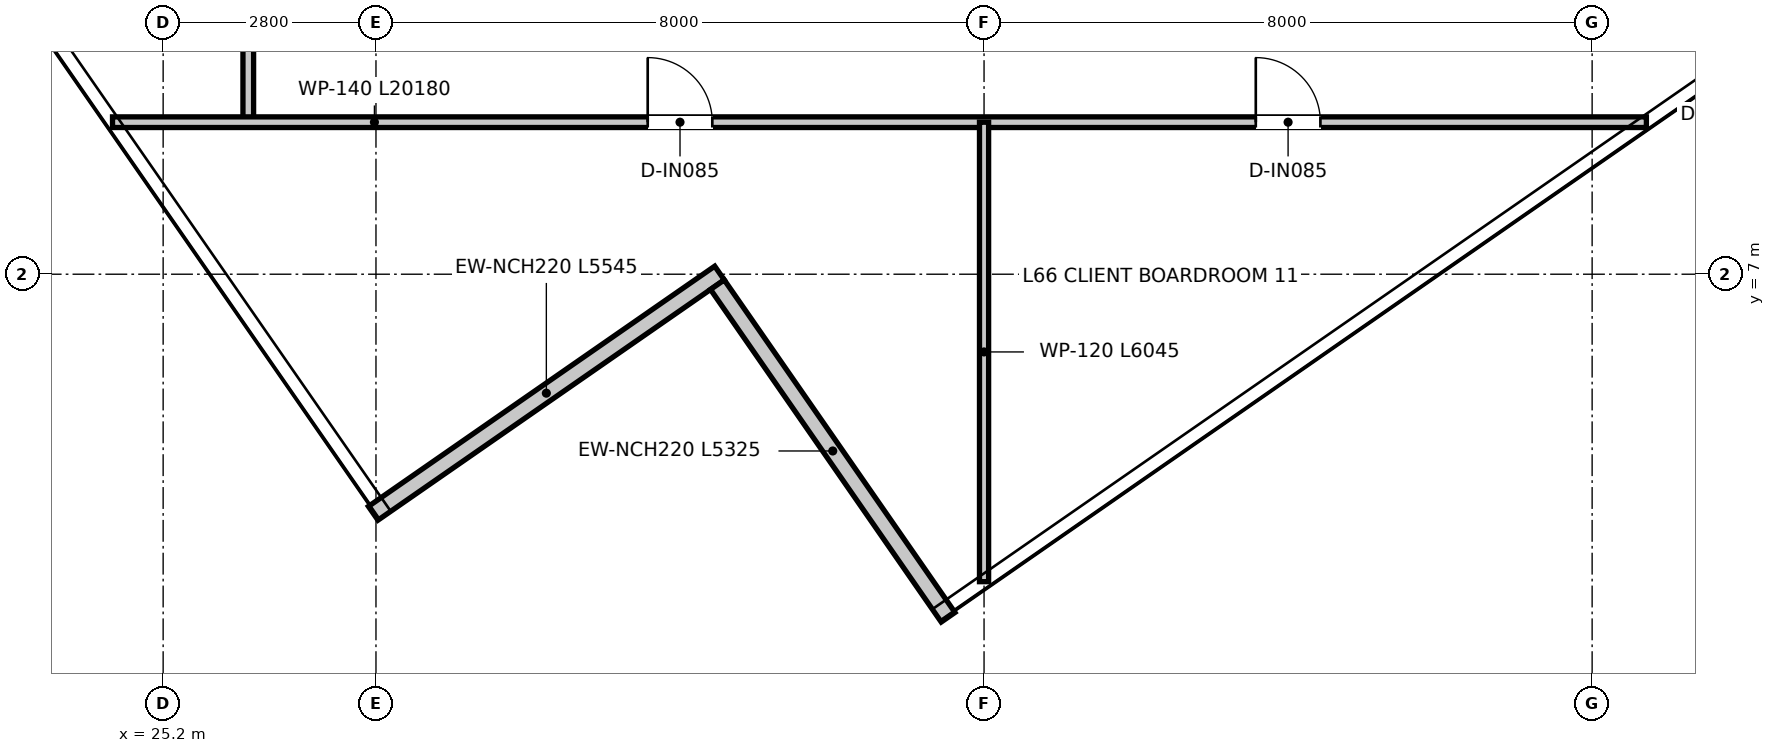
"""IFC4 building model, lengths in metres.
Left out: names, types, materials, properties, quantities, classifications, styles, units other than length and angle.
Written with IfcOpenShell. Run it as: python <this file> out.ifc"""

import sys

from ifc_helpers import new_model, si_unit, direction, frame, frame_2d, origin, place, context, subcontext, project, spatial, rectangle, extrude, element, fill, save


model = new_model("IFC4")
c1 = context("Model", 3, precision=1e-05, world=origin(), true_north=direction((0.0, 1.0)))
c2 = subcontext(c1, "Body", "Model", "MODEL_VIEW")
j1 = project(units=[si_unit("LENGTHUNIT", "METRE"), si_unit("PLANEANGLEUNIT", "RADIAN")], contexts=[c1])
p1 = place(None, origin())
s1 = spatial("IfcSite", under=j1, at=p1, CompositionType="ELEMENT")
p2 = place(p1, origin())
s2 = spatial("IfcBuilding", under=s1, at=p2, CompositionType="ELEMENT")
p3 = place(p2, frame((0.0, 0.0, 271.35)))
s3 = spatial("IfcBuildingStorey", under=s2, at=p3, CompositionType="ELEMENT", Elevation=271.35)
p4 = place(p3, frame((27.963, 3.855, 0.0), z_axis=(0.0, 0.0, 1.0), x_axis=(0.821652918874, 0.569988141022, 0.0)))
e1 = element("IfcWall", 1, at=p4, inside=s3, PredefinedType="ELEMENTEDWALL", context=c2, shape_type="SweptSolid", body=[
    extrude(rectangle(XDim=5.545, YDim=0.22, at=frame_2d((2.772, 0.0))), origin(), (0.0, 0.0, 1.0), 3.67),
])
p5 = place(p3, frame((32.492, 6.862, 0.0), z_axis=(0.0, 0.0, 1.0), x_axis=(0.569998811791, -0.821645516361, 0.0)))
e2 = element("IfcWall", 2, at=p5, inside=s3, PredefinedType="ELEMENTEDWALL", context=c2, shape_type="SweptSolid", body=[
    extrude(rectangle(XDim=5.325, YDim=0.22, at=frame_2d((2.663, 0.0))), origin(), (0.0, 0.0, 1.0), 3.67),
])
p6 = place(p3, frame((26.32, 9.0, 0.0), z_axis=(0.0, 0.0, 1.0), x_axis=(0.0, 1.0, 0.0)))
e3 = element("IfcWall", 3, at=p6, inside=s3, PredefinedType="PARTITIONING", context=c2, shape_type="SweptSolid", body=[
    extrude(rectangle(XDim=19.66, YDim=0.14, at=frame_2d((9.83, 0.0))), origin(), (0.0, 0.0, 1.0), 3.13),
])
p7 = place(p6, frame((18.3, 0.0, 0.0)))
e4 = element("IfcOpeningElement", 4, at=p7, cuts=e3, PredefinedType="OPENING", context=c2, shape_type="SweptSolid", body=[
    extrude(rectangle(XDim=0.9, YDim=2.1, at=frame_2d((0.45, 1.05))), frame((0.0, 0.08, 0.0), z_axis=(0.0, -1.0, 0.0), x_axis=(1.0, 0.0, 0.0)), (0.0, 0.0, 1.0), 0.16),
])
p8 = place(p6, frame((9.8, 0.0, 0.0)))
e5 = element("IfcOpeningElement", 5, at=p8, cuts=e3, PredefinedType="OPENING", context=c2, shape_type="SweptSolid", body=[
    extrude(rectangle(XDim=0.9, YDim=2.1, at=frame_2d((0.45, 1.05))), frame((0.0, 0.08, 0.0), z_axis=(0.0, -1.0, 0.0), x_axis=(1.0, 0.0, 0.0)), (0.0, 0.0, 1.0), 0.16),
])
p9 = place(p6, frame((14.46, 0.0, 0.0)))
e6 = element("IfcOpeningElement", 6, at=p9, cuts=e3, PredefinedType="OPENING", context=c2, shape_type="SweptSolid", body=[
    extrude(rectangle(XDim=0.9, YDim=2.1, at=frame_2d((0.45, 1.05))), frame((0.0, 0.08, 0.0), z_axis=(0.0, -1.0, 0.0), x_axis=(1.0, 0.0, 0.0)), (0.0, 0.0, 1.0), 0.16),
])
p10 = place(p3, frame((24.534, 9.0, 0.0), z_axis=(0.0, 0.0, 1.0), x_axis=(1.0, 0.0, 0.0)))
e7 = element("IfcWall", 7, at=p10, inside=s3, PredefinedType="PARTITIONING", context=c2, shape_type="SweptSolid", body=[
    extrude(rectangle(XDim=20.18, YDim=0.14, at=frame_2d((10.09, 0.0))), origin(), (0.0, 0.0, 1.0), 3.67),
])
p11 = place(p10, frame((7.041, 0.0, 0.0)))
e8 = element("IfcOpeningElement", 8, at=p11, cuts=e7, PredefinedType="OPENING", context=c2, shape_type="SweptSolid", body=[
    extrude(rectangle(XDim=0.85, YDim=2.1, at=frame_2d((0.425, 1.05))), frame((0.0, 0.08, 0.0), z_axis=(0.0, -1.0, 0.0), x_axis=(1.0, 0.0, 0.0)), (0.0, 0.0, 1.0), 0.16),
])
p12 = place(p10, frame((15.041, 0.0, 0.0)))
e9 = element("IfcOpeningElement", 9, at=p12, cuts=e7, PredefinedType="OPENING", context=c2, shape_type="SweptSolid", body=[
    extrude(rectangle(XDim=0.85, YDim=2.1, at=frame_2d((0.425, 1.05))), frame((0.0, 0.08, 0.0), z_axis=(0.0, -1.0, 0.0), x_axis=(1.0, 0.0, 0.0)), (0.0, 0.0, 1.0), 0.16),
])
p13 = place(p3, frame((36.0, 2.955, 0.0), z_axis=(0.0, 0.0, 1.0), x_axis=(0.0, 1.0, 0.0)))
e10 = element("IfcWall", 10, at=p13, inside=s3, PredefinedType="PARTITIONING", context=c2, shape_type="SweptSolid", body=[
    extrude(rectangle(XDim=6.045, YDim=0.12, at=frame_2d((3.022, 0.0))), origin(), (0.0, 0.0, 1.0), 3.67),
])
p14 = place(p11, origin())
e11 = element("IfcDoor", 11, at=p14, inside=s3, OperationType="SINGLE_SWING_LEFT", PredefinedType="DOOR", context=c2, shape_type="SweptSolid", body=[
    extrude(rectangle(XDim=0.85, YDim=2.1, at=frame_2d((0.425, 1.05))), frame((0.0, 0.025, 0.0), z_axis=(0.0, -1.0, 0.0), x_axis=(1.0, 0.0, 0.0)), (0.0, 0.0, 1.0), 0.05),
])
fill(e8, e11)
p15 = place(p12, origin())
e12 = element("IfcDoor", 12, at=p15, inside=s3, OperationType="SINGLE_SWING_LEFT", PredefinedType="DOOR", context=c2, shape_type="SweptSolid", body=[
    extrude(rectangle(XDim=0.85, YDim=2.1, at=frame_2d((0.425, 1.05))), frame((0.0, 0.025, 0.0), z_axis=(0.0, -1.0, 0.0), x_axis=(1.0, 0.0, 0.0)), (0.0, 0.0, 1.0), 0.05),
])
fill(e9, e12)
save(model, sys.argv[1])
